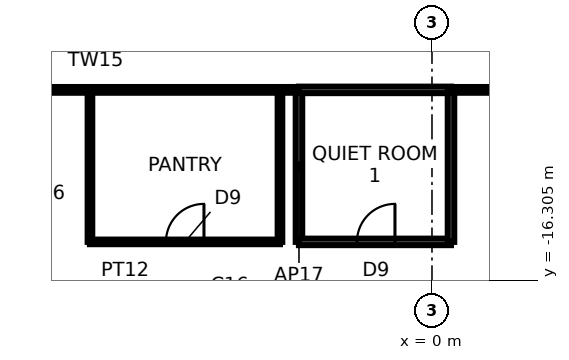
"""IFC4 building model, lengths in metres.
Left out: names, types, materials, properties, quantities, classifications, styles, units other than length and angle.
Written with IfcOpenShell. Run it as: python <this file> out.ifc"""

import sys

from ifc_helpers import new_model, si_unit, direction, frame, frame_2d, origin, place, context, subcontext, project, spatial, rectangle, extrude, element, fill, save


model = new_model("IFC4")
c1 = context("Model", 3, precision=1e-05, world=origin(), true_north=direction((0.0, 1.0)))
c2 = subcontext(c1, "Body", "Model", "MODEL_VIEW")
j1 = project(units=[si_unit("LENGTHUNIT", "METRE"), si_unit("PLANEANGLEUNIT", "RADIAN")], contexts=[c1])
p1 = place(None, origin())
s1 = spatial("IfcSite", under=j1, at=p1, CompositionType="ELEMENT")
p2 = place(p1, origin())
s2 = spatial("IfcBuilding", under=s1, at=p2, CompositionType="ELEMENT")
p3 = place(p2, frame((0.0, 0.0, 127.5)))
s3 = spatial("IfcBuildingStorey", under=s2, at=p3, CompositionType="ELEMENT", Elevation=127.5)
p4 = place(p3, frame((-14.2, -11.3, 0.0), z_axis=(0.0, 0.0, 1.0), x_axis=(1.0, 0.0, 0.0)))
e1 = element("IfcWall", 1, at=p4, inside=s3, PredefinedType="PARTITIONING", context=c2, shape_type="SweptSolid", body=[
    extrude(rectangle(XDim=10.7, YDim=0.15, at=frame_2d((5.35, 0.0))), origin(), (0.0, 0.0, 1.0), 3.74),
])
p5 = place(p3, frame((-9.0, -11.3, 0.0), z_axis=(0.0, 0.0, 1.0), x_axis=(0.0, -1.0, 0.0)))
e2 = element("IfcWall", 2, at=p5, inside=s3, PredefinedType="PARTITIONING", context=c2, shape_type="SweptSolid", body=[
    extrude(rectangle(XDim=4.0, YDim=0.12, at=frame_2d((2.0, 0.0))), origin(), (0.0, 0.0, 1.0), 3.74),
])
p6 = place(p3, frame((-9.0, -15.3, 0.0), z_axis=(0.0, 0.0, 1.0), x_axis=(1.0, 0.0, 0.0)))
e3 = element("IfcWall", 3, at=p6, inside=s3, PredefinedType="PARTITIONING", context=c2, shape_type="SweptSolid", body=[
    extrude(rectangle(XDim=5.0, YDim=0.12, at=frame_2d((2.5, 0.0))), origin(), (0.0, 0.0, 1.0), 3.286),
])
p7 = place(p6, frame((2.0, 0.0, 0.0)))
e4 = element("IfcOpeningElement", 4, at=p7, cuts=e3, PredefinedType="OPENING", context=c2, shape_type="SweptSolid", body=[
    extrude(rectangle(XDim=1.0, YDim=2.4, at=frame_2d((0.5, 1.2))), frame((0.0, 0.07, 0.0), z_axis=(0.0, -1.0, 0.0), x_axis=(1.0, 0.0, 0.0)), (0.0, 0.0, 1.0), 0.14),
])
p8 = place(p3, frame((-4.0, -15.3, 0.0), z_axis=(0.0, 0.0, 1.0), x_axis=(0.0, 1.0, 0.0)))
e5 = element("IfcWall", 5, at=p8, inside=s3, PredefinedType="PARTITIONING", context=c2, shape_type="SweptSolid", body=[
    extrude(rectangle(XDim=4.0, YDim=0.12, at=frame_2d((2.0, 0.0))), origin(), (0.0, 0.0, 1.0), 3.74),
])
for number, where, z_axis, x_axis in (
    (6, (-3.5, -11.3, 0.0), (0.0, 0.0, 1.0), (0.0, -1.0, 0.0)),
    (7, (0.5, -11.3, 0.0), (0.0, 0.0, 1.0), (-1.0, 0.0, 0.0)),
):
    element("IfcWall", number, at=place(p3, frame(where, z_axis=z_axis, x_axis=x_axis)), inside=s3, PredefinedType="PARTITIONING", context=c2, shape_type="SweptSolid", body=[
        extrude(rectangle(XDim=4.0, YDim=0.17, at=frame_2d((2.0, 0.0))), origin(), (0.0, 0.0, 1.0), 3.74),
    ])
p9 = place(p3, frame((-3.5, -15.3, 0.0), z_axis=(0.0, 0.0, 1.0), x_axis=(1.0, 0.0, 0.0)))
e8 = element("IfcWall", 8, at=p9, inside=s3, PredefinedType="PARTITIONING", context=c2, shape_type="SweptSolid", body=[
    extrude(rectangle(XDim=4.0, YDim=0.17, at=frame_2d((2.0, 0.0))), origin(), (0.0, 0.0, 1.0), 3.74),
])
p10 = place(p9, frame((1.526, 0.0, 0.0)))
e9 = element("IfcOpeningElement", 9, at=p10, cuts=e8, PredefinedType="OPENING", context=c2, shape_type="SweptSolid", body=[
    extrude(rectangle(XDim=1.0, YDim=2.4, at=frame_2d((0.5, 1.2))), frame((0.0, 0.095, 0.0), z_axis=(0.0, -1.0, 0.0), x_axis=(1.0, 0.0, 0.0)), (0.0, 0.0, 1.0), 0.19),
])
p11 = place(p3, frame((0.5, -15.3, 0.0), z_axis=(0.0, 0.0, 1.0), x_axis=(0.0, 1.0, 0.0)))
e10 = element("IfcWall", 10, at=p11, inside=s3, PredefinedType="PARTITIONING", context=c2, shape_type="SweptSolid", body=[
    extrude(rectangle(XDim=4.0, YDim=0.17, at=frame_2d((2.0, 0.0))), origin(), (0.0, 0.0, 1.0), 3.74),
])
p12 = place(p3, frame((0.5, -11.3, 0.0), z_axis=(0.0, 0.0, 1.0), x_axis=(1.0, 0.0, 0.0)))
e11 = element("IfcWall", 11, at=p12, inside=s3, PredefinedType="PARTITIONING", context=c2, shape_type="SweptSolid", body=[
    extrude(rectangle(XDim=3.5, YDim=0.15, at=frame_2d((1.75, 0.0))), origin(), (0.0, 0.0, 1.0), 3.74),
])
p13 = place(p7, origin())
e12 = element("IfcDoor", 12, at=p13, inside=s3, OperationType="SINGLE_SWING_RIGHT", PredefinedType="DOOR", context=c2, shape_type="SweptSolid", body=[
    extrude(rectangle(XDim=1.0, YDim=2.4, at=frame_2d((0.5, 1.2))), frame((0.0, 0.025, 0.0), z_axis=(0.0, -1.0, 0.0), x_axis=(1.0, 0.0, 0.0)), (0.0, 0.0, 1.0), 0.05),
])
fill(e4, e12)
p14 = place(p10, origin())
e13 = element("IfcDoor", 13, at=p14, inside=s3, OperationType="SINGLE_SWING_RIGHT", PredefinedType="DOOR", context=c2, shape_type="SweptSolid", body=[
    extrude(rectangle(XDim=1.0, YDim=2.4, at=frame_2d((0.5, 1.2))), frame((0.0, 0.025, 0.0), z_axis=(0.0, -1.0, 0.0), x_axis=(1.0, 0.0, 0.0)), (0.0, 0.0, 1.0), 0.05),
])
fill(e9, e13)
save(model, sys.argv[1])
